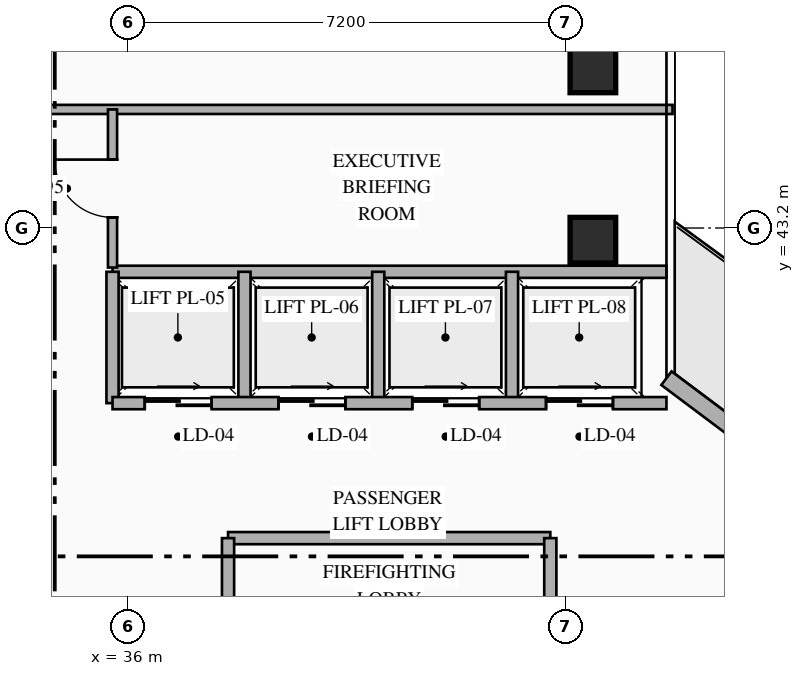
"""IFC4 building model, lengths in metres.
Left out: names, types, materials, properties, quantities, classifications, styles, units other than length and angle.
Written with IfcOpenShell. Run it as: python <this file> out.ifc"""

import sys

from ifc_helpers import new_model, si_unit, direction, frame, frame_2d, origin, origin_2d, place, context, subcontext, project, spatial, rectangle, hollow_rectangle, extrude, element, fill, save


model = new_model("IFC4")
c1 = context("Model", 3, precision=1e-05, world=origin(), true_north=direction((0.0, 1.0)))
c2 = subcontext(c1, "Body", "Model", "MODEL_VIEW")
j1 = project(units=[si_unit("LENGTHUNIT", "METRE"), si_unit("PLANEANGLEUNIT", "RADIAN")], contexts=[c1])
p1 = place(None, origin())
s1 = spatial("IfcSite", under=j1, at=p1, CompositionType="ELEMENT")
p2 = place(p1, origin())
s2 = spatial("IfcBuilding", under=s1, at=p2, CompositionType="ELEMENT")
p3 = place(p2, frame((0.0, 0.0, 213.15)))
s3 = spatial("IfcBuildingStorey", under=s2, at=p3, CompositionType="ELEMENT", Elevation=213.15)
for number, where, z_axis, x_axis in (
    (1, (43.65, 43.0, 0.0), (0.0, 0.0, 1.0), (1.0, 0.0, 0.0)),
    (2, (43.65, 45.8, 0.0), (0.0, 0.0, 1.0), (1.0, 0.0, 0.0)),
):
    element("IfcColumn", number, at=place(p3, frame(where, z_axis=z_axis, x_axis=x_axis)), inside=s3, PredefinedType="COLUMN", context=c2, shape_type="SweptSolid", body=[
        extrude(hollow_rectangle(XDim=0.75, YDim=0.75, WallThickness=0.028, at=origin_2d()), origin(), (0.0, 0.0, 1.0), 3.6),
    ])
p4 = place(p3, frame((44.86, 40.73, 0.0), z_axis=(0.0, 0.0, 1.0), x_axis=(0.800007624502, -0.599989833863, 0.0)))
e3 = element("IfcWall", 3, at=p4, inside=s3, PredefinedType="STANDARD", context=c2, shape_type="SweptSolid", body=[
    extrude(rectangle(XDim=19.212, YDim=0.28, at=frame_2d((9.606, 0.0))), origin(), (0.0, 0.0, 1.0), 3.35),
])
p5 = place(p4, frame((1.755, 0.0, 0.0)))
e4 = element("IfcOpeningElement", 4, at=p5, cuts=e3, PredefinedType="OPENING", context=c2, shape_type="SweptSolid", body=[
    extrude(rectangle(XDim=1.1, YDim=2.2, at=frame_2d((0.55, 1.1))), frame((0.0, 0.15, 0.0), z_axis=(0.0, -1.0, 0.0), x_axis=(1.0, 0.0, 0.0)), (0.0, 0.0, 1.0), 0.3),
])
p6 = place(p4, frame((13.509, 0.0, 0.85)))
e5 = element("IfcOpeningElement", 5, at=p6, cuts=e3, PredefinedType="OPENING", context=c2, shape_type="SweptSolid", body=[
    extrude(rectangle(XDim=1.8, YDim=2.1, at=frame_2d((0.9, 1.05))), frame((0.0, 0.15, 0.0), z_axis=(0.0, -1.0, 0.0), x_axis=(1.0, 0.0, 0.0)), (0.0, 0.0, 1.0), 0.3),
])
p7 = place(p3, frame((37.65, 38.1, 0.0), z_axis=(0.0, 0.0, 1.0), x_axis=(1.0, 0.0, 0.0)))
e6 = element("IfcWall", 6, at=p7, inside=s3, PredefinedType="STANDARD", context=c2, shape_type="SweptSolid", body=[
    extrude(rectangle(XDim=5.3, YDim=0.2, at=frame_2d((2.65, 0.0))), origin(), (0.0, 0.0, 1.0), 3.35),
])
p8 = place(p3, frame((42.95, 35.12, 0.0), z_axis=(0.0, 0.0, 1.0), x_axis=(0.0, 1.0, 0.0)))
e7 = element("IfcWall", 7, at=p8, inside=s3, PredefinedType="STANDARD", context=c2, shape_type="SweptSolid", body=[
    extrude(rectangle(XDim=2.98, YDim=0.2, at=frame_2d((1.49, 0.0))), origin(), (0.0, 0.0, 1.0), 3.35),
])
p9 = place(p3, frame((37.65, 35.12, 0.0), z_axis=(0.0, 0.0, 1.0), x_axis=(0.0, 1.0, 0.0)))
e8 = element("IfcWall", 8, at=p9, inside=s3, PredefinedType="STANDARD", context=c2, shape_type="SweptSolid", body=[
    extrude(rectangle(XDim=2.98, YDim=0.2, at=frame_2d((1.49, 0.0))), origin(), (0.0, 0.0, 1.0), 3.35),
])
p10 = place(p9, frame((0.99, 0.0, 0.0)))
e9 = element("IfcOpeningElement", 9, at=p10, cuts=e8, PredefinedType="OPENING", context=c2, shape_type="SweptSolid", body=[
    extrude(rectangle(XDim=1.0, YDim=2.2, at=frame_2d((0.5, 1.1))), frame((0.0, 0.11, 0.0), z_axis=(0.0, -1.0, 0.0), x_axis=(1.0, 0.0, 0.0)), (0.0, 0.0, 1.0), 0.22),
])
p11 = place(p3, frame((35.75, 42.48, 0.0), z_axis=(0.0, 0.0, 1.0), x_axis=(1.0, 0.0, 0.0)))
e10 = element("IfcWall", 10, at=p11, inside=s3, PredefinedType="STANDARD", context=c2, shape_type="SweptSolid", body=[
    extrude(rectangle(XDim=9.11, YDim=0.2, at=frame_2d((4.555, 0.0))), origin(), (0.0, 0.0, 1.0), 3.35),
])
for number, where, z_axis, x_axis in (
    (11, (35.75, 40.32, 0.0), (0.0, 0.0, 1.0), (0.0, 1.0, 0.0)),
    (12, (37.92, 40.32, 0.0), (0.0, 0.0, 1.0), (0.0, 1.0, 0.0)),
    (13, (40.12, 40.32, 0.0), (0.0, 0.0, 1.0), (0.0, 1.0, 0.0)),
    (14, (42.32, 40.32, 0.0), (0.0, 0.0, 1.0), (0.0, 1.0, 0.0)),
):
    element("IfcWall", number, at=place(p3, frame(where, z_axis=z_axis, x_axis=x_axis)), inside=s3, PredefinedType="STANDARD", context=c2, shape_type="SweptSolid", body=[
        extrude(rectangle(XDim=2.16, YDim=0.2, at=frame_2d((1.08, 0.0))), origin(), (0.0, 0.0, 1.0), 3.35),
    ])
p12 = place(p3, frame((35.75, 40.32, 0.0), z_axis=(0.0, 0.0, 1.0), x_axis=(1.0, 0.0, 0.0)))
e15 = element("IfcWall", 15, at=p12, inside=s3, PredefinedType="STANDARD", context=c2, shape_type="SweptSolid", body=[
    extrude(rectangle(XDim=9.11, YDim=0.2, at=frame_2d((4.555, 0.0))), origin(), (0.0, 0.0, 1.0), 3.35),
])
p13 = place(p12, frame((0.53, 0.0, 0.0)))
e16 = element("IfcOpeningElement", 16, at=p13, cuts=e15, PredefinedType="OPENING", context=c2, shape_type="SweptSolid", body=[
    extrude(rectangle(XDim=1.1, YDim=2.18, at=frame_2d((0.55, 1.09))), frame((0.0, 0.11, 0.0), z_axis=(0.0, -1.0, 0.0), x_axis=(1.0, 0.0, 0.0)), (0.0, 0.0, 1.0), 0.22),
])
p14 = place(p12, frame((2.73, 0.0, 0.0)))
e17 = element("IfcOpeningElement", 17, at=p14, cuts=e15, PredefinedType="OPENING", context=c2, shape_type="SweptSolid", body=[
    extrude(rectangle(XDim=1.1, YDim=2.18, at=frame_2d((0.55, 1.09))), frame((0.0, 0.11, 0.0), z_axis=(0.0, -1.0, 0.0), x_axis=(1.0, 0.0, 0.0)), (0.0, 0.0, 1.0), 0.22),
])
p15 = place(p12, frame((4.93, 0.0, 0.0)))
e18 = element("IfcOpeningElement", 18, at=p15, cuts=e15, PredefinedType="OPENING", context=c2, shape_type="SweptSolid", body=[
    extrude(rectangle(XDim=1.1, YDim=2.18, at=frame_2d((0.55, 1.09))), frame((0.0, 0.11, 0.0), z_axis=(0.0, -1.0, 0.0), x_axis=(1.0, 0.0, 0.0)), (0.0, 0.0, 1.0), 0.22),
])
p16 = place(p12, frame((7.13, 0.0, 0.0)))
e19 = element("IfcOpeningElement", 19, at=p16, cuts=e15, PredefinedType="OPENING", context=c2, shape_type="SweptSolid", body=[
    extrude(rectangle(XDim=1.1, YDim=2.18, at=frame_2d((0.55, 1.09))), frame((0.0, 0.11, 0.0), z_axis=(0.0, -1.0, 0.0), x_axis=(1.0, 0.0, 0.0)), (0.0, 0.0, 1.0), 0.22),
])
p17 = place(p3, frame((20.9, 45.15, 0.0), z_axis=(0.0, 0.0, 1.0), x_axis=(1.0, 0.0, 0.0)))
e20 = element("IfcWall", 20, at=p17, inside=s3, PredefinedType="PARTITIONING", context=c2, shape_type="SweptSolid", body=[
    extrude(rectangle(XDim=24.06, YDim=0.15, at=frame_2d((12.03, 0.0))), origin(), (0.0, 0.0, 1.0), 3.35),
])
p18 = place(p17, frame((9.32, 0.0, 0.0)))
e21 = element("IfcOpeningElement", 21, at=p18, cuts=e20, PredefinedType="OPENING", context=c2, shape_type="SweptSolid", body=[
    extrude(rectangle(XDim=0.95, YDim=2.15, at=frame_2d((0.475, 1.075))), frame((0.0, 0.085, 0.0), z_axis=(0.0, -1.0, 0.0), x_axis=(1.0, 0.0, 0.0)), (0.0, 0.0, 1.0), 0.17),
])
p19 = place(p3, frame((43.48, 31.773, 0.0), z_axis=(0.0, 0.0, 1.0), x_axis=(0.599971041729, 0.800021717885, 0.0)))
e22 = element("IfcWall", 22, at=p19, inside=s3, PredefinedType="PARTITIONING", context=c2, shape_type="SweptSolid", body=[
    extrude(rectangle(XDim=8.094, YDim=0.15, at=frame_2d((4.047, 0.0))), origin(), (0.0, 0.0, 1.0), 3.35),
])
p20 = place(p3, frame((35.75, 42.55, 0.0), z_axis=(0.0, 0.0, 1.0), x_axis=(0.0, 1.0, 0.0)))
e23 = element("IfcWall", 23, at=p20, inside=s3, PredefinedType="PARTITIONING", context=c2, shape_type="SweptSolid", body=[
    extrude(rectangle(XDim=2.6, YDim=0.15, at=frame_2d((1.3, 0.0))), origin(), (0.0, 0.0, 1.0), 3.35),
])
p21 = place(p20, frame((0.825, 0.0, 0.0)))
e24 = element("IfcOpeningElement", 24, at=p21, cuts=e23, PredefinedType="OPENING", context=c2, shape_type="SweptSolid", body=[
    extrude(rectangle(XDim=0.95, YDim=2.15, at=frame_2d((0.475, 1.075))), frame((0.0, 0.085, 0.0), z_axis=(0.0, -1.0, 0.0), x_axis=(1.0, 0.0, 0.0)), (0.0, 0.0, 1.0), 0.17),
])
p22 = place(p13, origin())
e25 = element("IfcDoor", 25, at=p22, inside=s3, OperationType="SLIDING_TO_RIGHT", PredefinedType="USERDEFINED", context=c2, shape_type="SweptSolid", body=[
    extrude(rectangle(XDim=1.1, YDim=2.18, at=frame_2d((0.55, 1.09))), frame((0.0, 0.025, 0.0), z_axis=(0.0, -1.0, 0.0), x_axis=(1.0, 0.0, 0.0)), (0.0, 0.0, 1.0), 0.05),
])
fill(e16, e25)
p23 = place(p14, origin())
e26 = element("IfcDoor", 26, at=p23, inside=s3, OperationType="SLIDING_TO_RIGHT", PredefinedType="USERDEFINED", context=c2, shape_type="SweptSolid", body=[
    extrude(rectangle(XDim=1.1, YDim=2.18, at=frame_2d((0.55, 1.09))), frame((0.0, 0.025, 0.0), z_axis=(0.0, -1.0, 0.0), x_axis=(1.0, 0.0, 0.0)), (0.0, 0.0, 1.0), 0.05),
])
fill(e17, e26)
p24 = place(p15, origin())
e27 = element("IfcDoor", 27, at=p24, inside=s3, OperationType="SLIDING_TO_RIGHT", PredefinedType="USERDEFINED", context=c2, shape_type="SweptSolid", body=[
    extrude(rectangle(XDim=1.1, YDim=2.18, at=frame_2d((0.55, 1.09))), frame((0.0, 0.025, 0.0), z_axis=(0.0, -1.0, 0.0), x_axis=(1.0, 0.0, 0.0)), (0.0, 0.0, 1.0), 0.05),
])
fill(e18, e27)
p25 = place(p16, origin())
e28 = element("IfcDoor", 28, at=p25, inside=s3, OperationType="SLIDING_TO_RIGHT", PredefinedType="USERDEFINED", context=c2, shape_type="SweptSolid", body=[
    extrude(rectangle(XDim=1.1, YDim=2.18, at=frame_2d((0.55, 1.09))), frame((0.0, 0.025, 0.0), z_axis=(0.0, -1.0, 0.0), x_axis=(1.0, 0.0, 0.0)), (0.0, 0.0, 1.0), 0.05),
])
fill(e19, e28)
p26 = place(p21, origin())
e29 = element("IfcDoor", 29, at=p26, inside=s3, OperationType="SINGLE_SWING_RIGHT", PredefinedType="DOOR", context=c2, shape_type="SweptSolid", body=[
    extrude(rectangle(XDim=0.95, YDim=2.15, at=frame_2d((0.475, 1.075))), frame((0.0, 0.025, 0.0), z_axis=(0.0, -1.0, 0.0), x_axis=(1.0, 0.0, 0.0)), (0.0, 0.0, 1.0), 0.05),
])
fill(e24, e29)
save(model, sys.argv[1])
